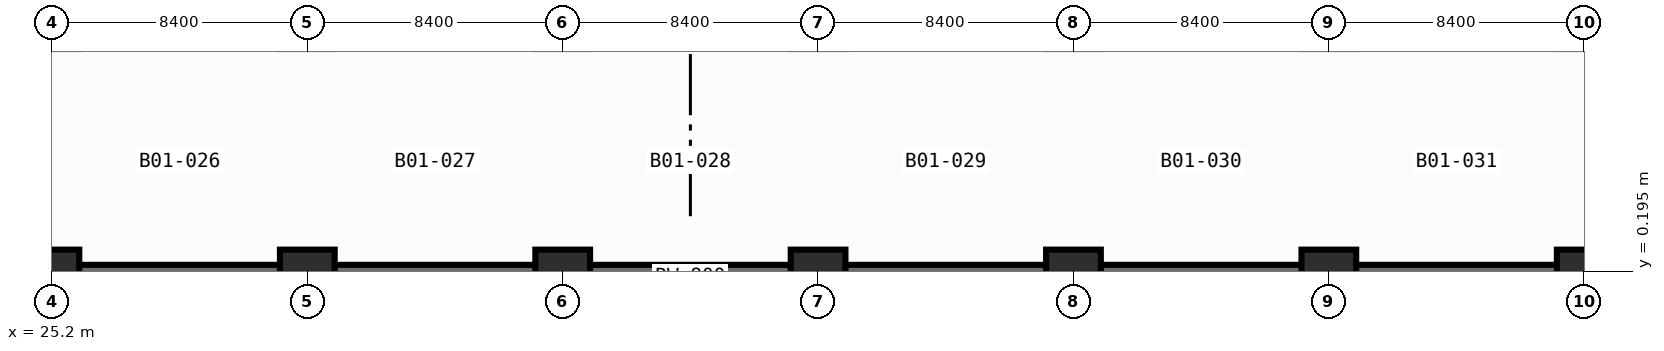
"""IFC4 building model, lengths in metres.
Left out: names, types, materials, properties, quantities, classifications, styles, units other than length and angle.
Written with IfcOpenShell. Run it as: python <this file> out.ifc"""

import sys

from ifc_helpers import new_model, si_unit, direction, frame, frame_2d, origin, origin_2d, place, context, subcontext, project, spatial, rectangle, extrude, element, save


model = new_model("IFC4")
c1 = context("Model", 3, precision=1e-05, world=origin(), true_north=direction((0.0, 1.0)))
c2 = subcontext(c1, "Body", "Model", "MODEL_VIEW")
j1 = project(units=[si_unit("LENGTHUNIT", "METRE"), si_unit("PLANEANGLEUNIT", "RADIAN")], contexts=[c1])
p1 = place(None, origin())
s1 = spatial("IfcSite", under=j1, at=p1, CompositionType="ELEMENT")
p2 = place(p1, origin())
s2 = spatial("IfcBuilding", under=s1, at=p2, CompositionType="ELEMENT")
p3 = place(p2, frame((0.0, 0.0, -4.2)))
s3 = spatial("IfcBuildingStorey", under=s2, at=p3, CompositionType="ELEMENT", Elevation=-4.2)
p4 = place(p3, frame((-0.4, 0.0, 0.0), z_axis=(0.0, 0.0, 1.0), x_axis=(1.0, 0.0, 0.0)))
e1 = element("IfcWall", 1, at=p4, inside=s3, PredefinedType="USERDEFINED", context=c2, shape_type="SweptSolid", body=[
    extrude(rectangle(XDim=93.2, YDim=0.8, at=frame_2d((46.6, 0.0))), origin(), (0.0, 0.0, 1.0), 3.62),
])
for number, where, z_axis, x_axis in (
    (2, (25.2, 0.0, 0.0), (0.0, 0.0, 1.0), (1.0, 0.0, 0.0)),
    (3, (33.6, 0.0, 0.0), (0.0, 0.0, 1.0), (1.0, 0.0, 0.0)),
    (4, (42.0, 0.0, 0.0), (0.0, 0.0, 1.0), (1.0, 0.0, 0.0)),
    (5, (50.4, 0.0, 0.0), (0.0, 0.0, 1.0), (1.0, 0.0, 0.0)),
    (6, (58.8, 0.0, 0.0), (0.0, 0.0, 1.0), (1.0, 0.0, 0.0)),
    (7, (67.2, 0.0, 0.0), (0.0, 0.0, 1.0), (1.0, 0.0, 0.0)),
    (8, (75.6, 0.0, 0.0), (0.0, 0.0, 1.0), (1.0, 0.0, 0.0)),
):
    element("IfcColumn", number, at=place(p3, frame(where, z_axis=z_axis, x_axis=x_axis)), inside=s3, PredefinedType="COLUMN", context=c2, shape_type="SweptSolid", body=[
        extrude(rectangle(XDim=1.8, YDim=1.8, at=origin_2d()), origin(), (0.0, 0.0, 1.0), 4.2),
    ])
save(model, sys.argv[1])
